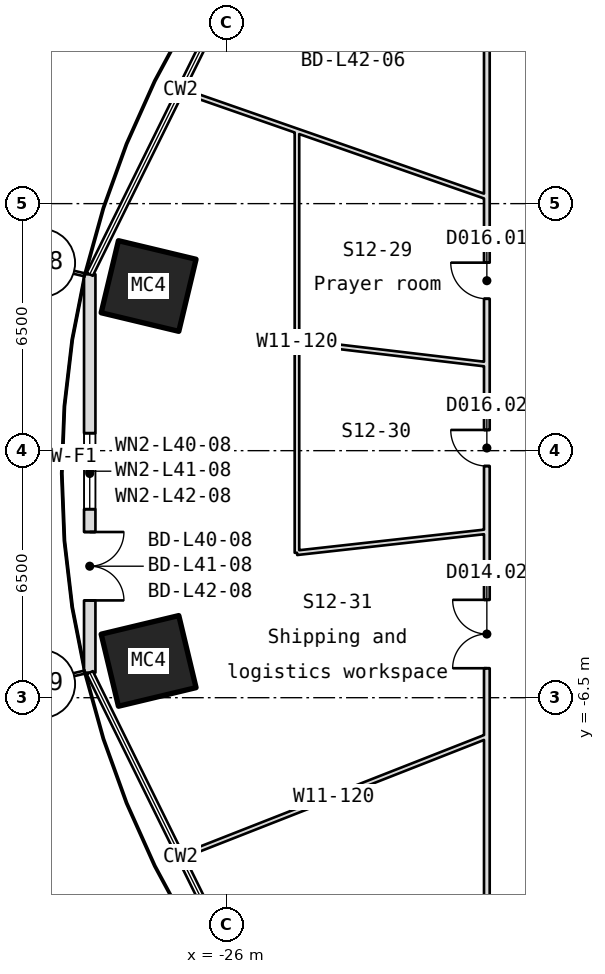
"""IFC4 building model, lengths in metres.
Left out: names, types, materials, properties, quantities, classifications, styles, units other than length and angle.
Written with IfcOpenShell. Run it as: python <this file> out.ifc"""

import sys

from ifc_helpers import new_model, si_unit, direction, frame, frame_2d, origin, origin_2d, place, context, subcontext, project, spatial, rectangle, hollow_rectangle, extrude, element, fill, save


model = new_model("IFC4")
c1 = context("Model", 3, precision=1e-05, world=origin(), true_north=direction((0.0, 1.0)))
c2 = subcontext(c1, "Body", "Model", "MODEL_VIEW")
j1 = project(units=[si_unit("LENGTHUNIT", "METRE"), si_unit("PLANEANGLEUNIT", "RADIAN")], contexts=[c1])
p1 = place(None, origin())
s1 = spatial("IfcSite", under=j1, at=p1, CompositionType="ELEMENT")
p2 = place(p1, origin())
s2 = spatial("IfcBuilding", under=s1, at=p2, CompositionType="ELEMENT")
p3 = place(p2, frame((0.0, 0.0, 185.95)))
s3 = spatial("IfcBuildingStorey", under=s2, at=p3, CompositionType="ELEMENT", Elevation=185.95)
for number, where, z_axis, x_axis in (
    (1, (-28.05, 4.332, -0.18), (0.0, 0.0, 1.0), (0.233, 0.973, 0.0)),
    (2, (-28.05, -5.532, -0.18), (0.0, 0.0, 1.0), (-0.233, 0.973, 0.0)),
):
    element("IfcColumn", number, at=place(p3, frame(where, z_axis=z_axis, x_axis=x_axis)), inside=s3, PredefinedType="COLUMN", context=c2, shape_type="SweptSolid", body=[
        extrude(hollow_rectangle(XDim=1.95, YDim=2.1, WallThickness=0.075, at=origin_2d()), origin(), (0.0, 0.0, 1.0), 4.15),
    ])
p4 = place(p3, frame((-29.6, 4.64, 0.0), z_axis=(0.0, 0.0, 1.0), x_axis=(0.0, -1.0, 0.0)))
e3 = element("IfcWall", 3, at=p4, inside=s3, PredefinedType="SOLIDWALL", context=c2, shape_type="SweptSolid", body=[
    extrude(rectangle(XDim=10.481, YDim=0.3, at=frame_2d((5.24, 0.0))), origin(), (0.0, 0.0, 1.0), 3.97),
])
p5 = place(p4, frame((6.781, 0.0, 0.0)))
e4 = element("IfcOpeningElement", 4, at=p5, cuts=e3, PredefinedType="OPENING", context=c2, shape_type="SweptSolid", body=[
    extrude(rectangle(XDim=1.8, YDim=2.4, at=frame_2d((0.9, 1.2))), frame((0.0, 0.16, 0.0), z_axis=(0.0, -1.0, 0.0), x_axis=(1.0, 0.0, 0.0)), (0.0, 0.0, 1.0), 0.32),
])
p6 = place(p4, frame((4.181, 0.0, 0.9)))
e5 = element("IfcOpeningElement", 5, at=p6, cuts=e3, PredefinedType="OPENING", context=c2, shape_type="SweptSolid", body=[
    extrude(rectangle(XDim=2.0, YDim=1.5, at=frame_2d((1.0, 0.75))), frame((0.0, 0.16, 0.0), z_axis=(0.0, -1.0, 0.0), x_axis=(1.0, 0.0, 0.0)), (0.0, 0.0, 1.0), 0.32),
])
p7 = place(p3, frame((-24.147, -2.687, 0.0), z_axis=(0.0, 0.0, 1.0), x_axis=(0.993868921716, 0.110564761322, 0.0)))
e6 = element("IfcWall", 6, at=p7, inside=s3, PredefinedType="PARTITIONING", context=c2, shape_type="SweptSolid", body=[
    extrude(rectangle(XDim=5.028, YDim=0.12, at=frame_2d((2.514, 0.0))), origin(), (0.0, 0.0, 1.0), 3.97),
])
p8 = place(p3, frame((-24.147, 2.864, 0.0), z_axis=(0.0, 0.0, 1.0), x_axis=(0.993037544931, -0.117798278244, 0.0)))
e7 = element("IfcWall", 7, at=p8, inside=s3, PredefinedType="PARTITIONING", context=c2, shape_type="SweptSolid", body=[
    extrude(rectangle(XDim=5.032, YDim=0.12, at=frame_2d((2.516, 0.0))), origin(), (0.0, 0.0, 1.0), 3.97),
])
p9 = place(p3, frame((-24.147, 8.415, 0.0), z_axis=(0.0, 0.0, 1.0), x_axis=(0.0, -1.0, 0.0)))
e8 = element("IfcWall", 8, at=p9, inside=s3, PredefinedType="PARTITIONING", context=c2, shape_type="SweptSolid", body=[
    extrude(rectangle(XDim=11.101, YDim=0.12, at=frame_2d((5.551, 0.0))), origin(), (0.0, 0.0, 1.0), 3.97),
])
p10 = place(p3, frame((-19.15, -16.15, 0.0), z_axis=(0.0, 0.0, 1.0), x_axis=(0.0, 1.0, 0.0)))
e9 = element("IfcWall", 9, at=p10, inside=s3, PredefinedType="PARTITIONING", context=c2, shape_type="SweptSolid", body=[
    extrude(rectangle(XDim=31.004, YDim=0.15, at=frame_2d((15.502, 0.0))), origin(), (0.0, 0.0, 1.0), 3.97),
])
p11 = place(p10, frame((20.147, 0.0, 0.0)))
e10 = element("IfcOpeningElement", 10, at=p11, cuts=e9, PredefinedType="OPENING", context=c2, shape_type="SweptSolid", body=[
    extrude(rectangle(XDim=0.95, YDim=2.1, at=frame_2d((0.475, 1.05))), frame((0.0, 0.085, 0.0), z_axis=(0.0, -1.0, 0.0), x_axis=(1.0, 0.0, 0.0)), (0.0, 0.0, 1.0), 0.17),
])
p12 = place(p10, frame((15.745, 0.0, 0.0)))
e11 = element("IfcOpeningElement", 11, at=p12, cuts=e9, PredefinedType="OPENING", context=c2, shape_type="SweptSolid", body=[
    extrude(rectangle(XDim=0.95, YDim=2.1, at=frame_2d((0.475, 1.05))), frame((0.0, 0.085, 0.0), z_axis=(0.0, -1.0, 0.0), x_axis=(1.0, 0.0, 0.0)), (0.0, 0.0, 1.0), 0.17),
])
p13 = place(p10, frame((10.425, 0.0, 0.0)))
e12 = element("IfcOpeningElement", 12, at=p13, cuts=e9, PredefinedType="OPENING", context=c2, shape_type="SweptSolid", body=[
    extrude(rectangle(XDim=1.8, YDim=2.1, at=frame_2d((0.9, 1.05))), frame((0.0, 0.085, 0.0), z_axis=(0.0, -1.0, 0.0), x_axis=(1.0, 0.0, 0.0)), (0.0, 0.0, 1.0), 0.17),
])
p14 = place(p3, frame((-19.15, -7.518, 0.0), z_axis=(0.0, 0.0, 1.0), x_axis=(-0.930851190322, -0.365398496816, 0.0)))
e13 = element("IfcWall", 13, at=p14, inside=s3, PredefinedType="PARTITIONING", context=c2, shape_type="SweptSolid", body=[
    extrude(rectangle(XDim=8.658, YDim=0.12, at=frame_2d((4.329, 0.0))), origin(), (0.0, 0.0, 1.0), 3.97),
])
p15 = place(p3, frame((-19.15, 6.673, 0.0), z_axis=(0.0, 0.0, 1.0), x_axis=(-0.944308326955, 0.329061975382, 0.0)))
e14 = element("IfcWall", 14, at=p15, inside=s3, PredefinedType="PARTITIONING", context=c2, shape_type="SweptSolid", body=[
    extrude(rectangle(XDim=8.535, YDim=0.12, at=frame_2d((4.268, 0.0))), origin(), (0.0, 0.0, 1.0), 3.97),
])
p16 = place(p5, origin())
e15 = element("IfcDoor", 15, at=p16, inside=s3, OperationType="SINGLE_SWING_LEFT", PredefinedType="DOOR", context=c2, shape_type="SweptSolid", body=[
    extrude(rectangle(XDim=1.8, YDim=2.4, at=frame_2d((0.9, 1.2))), frame((0.0, 0.025, 0.0), z_axis=(0.0, -1.0, 0.0), x_axis=(1.0, 0.0, 0.0)), (0.0, 0.0, 1.0), 0.05),
])
fill(e4, e15)
p17 = place(p6, origin())
e16 = element("IfcWindow", 16, at=p17, inside=s3, PartitioningType="SINGLE_PANEL", PredefinedType="WINDOW", context=c2, shape_type="SweptSolid", body=[
    extrude(rectangle(XDim=2.0, YDim=1.5, at=frame_2d((1.0, 0.75))), frame((0.0, 0.03, 0.0), z_axis=(0.0, -1.0, 0.0), x_axis=(1.0, 0.0, 0.0)), (0.0, 0.0, 1.0), 0.06),
])
fill(e5, e16)
p18 = place(p11, origin())
e17 = element("IfcDoor", 17, at=p18, inside=s3, OperationType="SINGLE_SWING_RIGHT", PredefinedType="DOOR", context=c2, shape_type="SweptSolid", body=[
    extrude(rectangle(XDim=0.95, YDim=2.1, at=frame_2d((0.475, 1.05))), frame((0.0, 0.025, 0.0), z_axis=(0.0, -1.0, 0.0), x_axis=(1.0, 0.0, 0.0)), (0.0, 0.0, 1.0), 0.05),
])
fill(e10, e17)
p19 = place(p12, origin())
e18 = element("IfcDoor", 18, at=p19, inside=s3, OperationType="SINGLE_SWING_RIGHT", PredefinedType="DOOR", context=c2, shape_type="SweptSolid", body=[
    extrude(rectangle(XDim=0.95, YDim=2.1, at=frame_2d((0.475, 1.05))), frame((0.0, 0.025, 0.0), z_axis=(0.0, -1.0, 0.0), x_axis=(1.0, 0.0, 0.0)), (0.0, 0.0, 1.0), 0.05),
])
fill(e11, e18)
p20 = place(p13, origin())
e19 = element("IfcDoor", 19, at=p20, inside=s3, OperationType="DOUBLE_DOOR_SINGLE_SWING", PredefinedType="DOOR", context=c2, shape_type="SweptSolid", body=[
    extrude(rectangle(XDim=1.8, YDim=2.1, at=frame_2d((0.9, 1.05))), frame((0.0, 0.025, 0.0), z_axis=(0.0, -1.0, 0.0), x_axis=(1.0, 0.0, 0.0)), (0.0, 0.0, 1.0), 0.05),
])
fill(e12, e19)
save(model, sys.argv[1])
